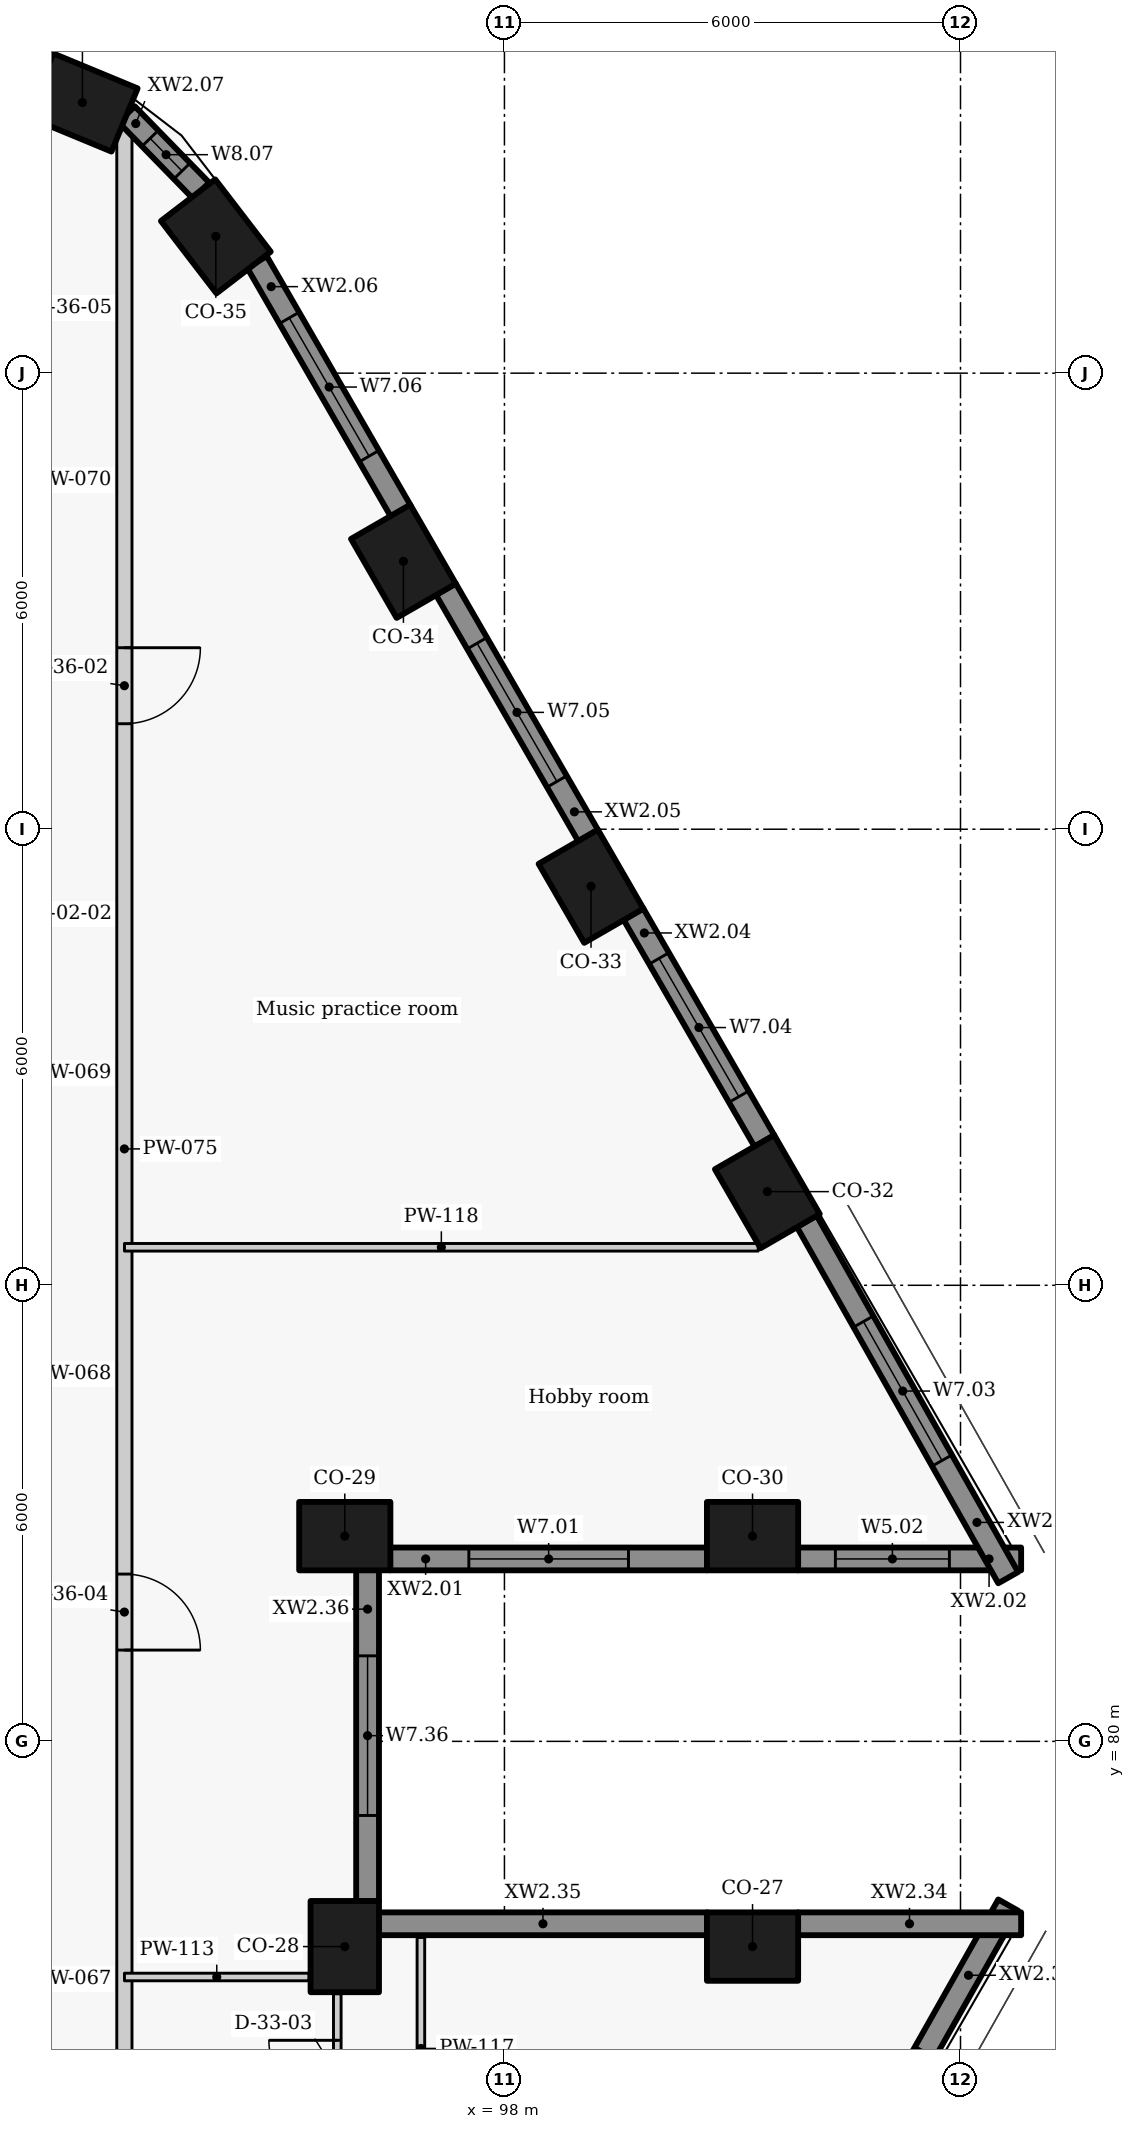
"""IFC4 building model, lengths in metres.
Left out: names, types, materials, properties, quantities, classifications, styles, units other than length and angle.
Written with IfcOpenShell. Run it as: python <this file> out.ifc"""

import sys

from ifc_helpers import new_model, si_unit, direction, frame, frame_2d, origin, origin_2d, place, context, subcontext, project, spatial, rectangle, extrude, element, fill, save


model = new_model("IFC4")
c1 = context("Model", 3, precision=1e-05, world=origin(), true_north=direction((0.0, 1.0)))
c2 = subcontext(c1, "Body", "Model", "MODEL_VIEW")
j1 = project(units=[si_unit("LENGTHUNIT", "METRE"), si_unit("PLANEANGLEUNIT", "RADIAN")], contexts=[c1])
p1 = place(None, origin())
s1 = spatial("IfcSite", under=j1, at=p1, CompositionType="ELEMENT")
p2 = place(p1, origin())
s2 = spatial("IfcBuilding", under=s1, at=p2, CompositionType="ELEMENT")
p3 = place(p2, frame((0.0, 0.0, 216.3)))
s3 = spatial("IfcBuildingStorey", under=s2, at=p3, CompositionType="ELEMENT", Elevation=216.3)
for number, where, z_axis, x_axis in (
    (1, (101.264, 77.3, 0.0), (0.0, 0.0, 1.0), (-1.0, 0.0, 0.0)),
    (2, (95.899, 77.3, 0.0), (0.0, 0.0, 1.0), (0.0, 1.0, 0.0)),
    (3, (95.899, 82.7, 0.0), (0.0, 0.0, 1.0), (1.0, 0.0, 0.0)),
    (4, (101.264, 82.7, 0.0), (0.0, 0.0, 1.0), (1.0, 0.0, 0.0)),
    (5, (101.459, 87.232, 0.0), (0.0, 0.0, 1.0), (-0.5, 0.866, 0.0)),
    (6, (99.139, 91.25, 0.0), (0.0, 0.0, 1.0), (-0.5, 0.866, 0.0)),
    (7, (96.671, 95.525, 0.0), (0.0, 0.0, 1.0), (-0.5, 0.866, 0.0)),
    (8, (94.203, 99.8, 0.0), (0.0, 0.0, 1.0), (-0.609, 0.793, 0.0)),
    (9, (92.448, 101.56, 0.0), (0.0, 0.0, 1.0), (-0.924, 0.383, 0.0)),
):
    element("IfcColumn", number, at=place(p3, frame(where, z_axis=z_axis, x_axis=x_axis)), inside=s3, PredefinedType="COLUMN", context=c2, shape_type="SweptSolid", body=[
        extrude(rectangle(XDim=1.2, YDim=0.9, at=origin_2d()), origin(), (0.0, 0.0, 1.0), 3.3),
    ])
p4 = place(p3, frame((96.496, 82.4, 0.0), z_axis=(0.0, 0.0, 1.0), x_axis=(1.0, 0.0, 0.0)))
e10 = element("IfcWall", 10, at=p4, inside=s3, PredefinedType="SOLIDWALL", context=c2, shape_type="SweptSolid", body=[
    extrude(rectangle(XDim=4.172, YDim=0.3, at=frame_2d((2.086, 0.0))), origin(), (0.0, 0.0, 1.0), 2.05),
])
p5 = place(p4, frame((1.036, 0.0, 0.9)))
e11 = element("IfcOpeningElement", 11, at=p5, cuts=e10, PredefinedType="OPENING", context=c2, shape_type="SweptSolid", body=[
    extrude(rectangle(XDim=2.1, YDim=1.1, at=frame_2d((1.05, 0.55))), frame((0.0, 0.16, 0.0), z_axis=(0.0, -1.0, 0.0), x_axis=(1.0, 0.0, 0.0)), (0.0, 0.0, 1.0), 0.32),
])
p6 = place(p3, frame((101.86, 82.4, 0.0), z_axis=(0.0, 0.0, 1.0), x_axis=(1.0, 0.0, 0.0)))
e12 = element("IfcWall", 12, at=p6, inside=s3, PredefinedType="SOLIDWALL", context=c2, shape_type="SweptSolid", body=[
    extrude(rectangle(XDim=2.938, YDim=0.3, at=frame_2d((1.469, 0.0))), origin(), (0.0, 0.0, 1.0), 2.05),
])
p7 = place(p6, frame((0.494, 0.0, 0.9)))
e13 = element("IfcOpeningElement", 13, at=p7, cuts=e12, PredefinedType="OPENING", context=c2, shape_type="SweptSolid", body=[
    extrude(rectangle(XDim=1.5, YDim=1.1, at=frame_2d((0.75, 0.55))), frame((0.0, 0.16, 0.0), z_axis=(0.0, -1.0, 0.0), x_axis=(1.0, 0.0, 0.0)), (0.0, 0.0, 1.0), 0.32),
])
p8 = place(p3, frame((104.627, 82.154, 0.0), z_axis=(0.0, 0.0, 1.0), x_axis=(-0.492033360928, 0.870576344575, 0.0)))
e14 = element("IfcWall", 14, at=p8, inside=s3, PredefinedType="SOLIDWALL", context=c2, shape_type="SweptSolid", body=[
    extrude(rectangle(XDim=5.387, YDim=0.3, at=frame_2d((2.693, 0.0))), origin(), (0.0, 0.0, 1.0), 2.05),
])
p9 = place(p8, frame((1.77, 0.0, 0.9)))
e15 = element("IfcOpeningElement", 15, at=p9, cuts=e14, PredefinedType="OPENING", context=c2, shape_type="SweptSolid", body=[
    extrude(rectangle(XDim=2.1, YDim=1.1, at=frame_2d((1.05, 0.55))), frame((0.0, 0.16, 0.0), z_axis=(0.0, -1.0, 0.0), x_axis=(1.0, 0.0, 0.0)), (0.0, 0.0, 1.0), 0.32),
])
p10 = place(p3, frame((101.421, 87.898, 0.0), z_axis=(0.0, 0.0, 1.0), x_axis=(-0.499955427682, 0.866051136095, 0.0)))
e16 = element("IfcWall", 16, at=p10, inside=s3, PredefinedType="SOLIDWALL", context=c2, shape_type="SweptSolid", body=[
    extrude(rectangle(XDim=3.447, YDim=0.3, at=frame_2d((1.724, 0.0))), origin(), (0.0, 0.0, 1.0), 2.05),
])
p11 = place(p10, frame((0.674, 0.0, 0.9)))
e17 = element("IfcOpeningElement", 17, at=p11, cuts=e16, PredefinedType="OPENING", context=c2, shape_type="SweptSolid", body=[
    extrude(rectangle(XDim=2.1, YDim=1.1, at=frame_2d((1.05, 0.55))), frame((0.0, 0.16, 0.0), z_axis=(0.0, -1.0, 0.0), x_axis=(1.0, 0.0, 0.0)), (0.0, 0.0, 1.0), 0.32),
])
p12 = place(p3, frame((99.101, 91.916, 0.0), z_axis=(0.0, 0.0, 1.0), x_axis=(-0.500059225181, 0.86599120741, 0.0)))
e18 = element("IfcWall", 18, at=p12, inside=s3, PredefinedType="SOLIDWALL", context=c2, shape_type="SweptSolid", body=[
    extrude(rectangle(XDim=3.744, YDim=0.3, at=frame_2d((1.872, 0.0))), origin(), (0.0, 0.0, 1.0), 2.05),
])
p13 = place(p12, frame((0.822, 0.0, 0.9)))
e19 = element("IfcOpeningElement", 19, at=p13, cuts=e18, PredefinedType="OPENING", context=c2, shape_type="SweptSolid", body=[
    extrude(rectangle(XDim=2.1, YDim=1.1, at=frame_2d((1.05, 0.55))), frame((0.0, 0.16, 0.0), z_axis=(0.0, -1.0, 0.0), x_axis=(1.0, 0.0, 0.0)), (0.0, 0.0, 1.0), 0.32),
])
p14 = place(p3, frame((96.633, 96.191, 0.0), z_axis=(0.0, 0.0, 1.0), x_axis=(-0.499961087031, 0.866047869032, 0.0)))
e20 = element("IfcWall", 20, at=p14, inside=s3, PredefinedType="SOLIDWALL", context=c2, shape_type="SweptSolid", body=[
    extrude(rectangle(XDim=3.779, YDim=0.3, at=frame_2d((1.889, 0.0))), origin(), (0.0, 0.0, 1.0), 2.05),
])
p15 = place(p14, frame((0.828, 0.0, 0.9)))
e21 = element("IfcOpeningElement", 21, at=p15, cuts=e20, PredefinedType="OPENING", context=c2, shape_type="SweptSolid", body=[
    extrude(rectangle(XDim=2.1, YDim=1.1, at=frame_2d((1.05, 0.55))), frame((0.0, 0.16, 0.0), z_axis=(0.0, -1.0, 0.0), x_axis=(1.0, 0.0, 0.0)), (0.0, 0.0, 1.0), 0.32),
])
p16 = place(p3, frame((94.009, 100.402, 0.0), z_axis=(0.0, 0.0, 1.0), x_axis=(-0.69817596362, 0.715926199984, 0.0)))
e22 = element("IfcWall", 22, at=p16, inside=s3, PredefinedType="SOLIDWALL", context=c2, shape_type="SweptSolid", body=[
    extrude(rectangle(XDim=1.403, YDim=0.3, at=frame_2d((0.701, 0.0))), origin(), (0.0, 0.0, 1.0), 2.05),
])
p17 = place(p16, frame((0.36, 0.0, 0.9)))
e23 = element("IfcOpeningElement", 23, at=p17, cuts=e22, PredefinedType="OPENING", context=c2, shape_type="SweptSolid", body=[
    extrude(rectangle(XDim=0.6, YDim=1.1, at=frame_2d((0.3, 0.55))), frame((0.0, 0.16, 0.0), z_axis=(0.0, -1.0, 0.0), x_axis=(1.0, 0.0, 0.0)), (0.0, 0.0, 1.0), 0.32),
])
p18 = place(p3, frame((101.977, 73.157, 0.0), z_axis=(0.0, 0.0, 1.0), x_axis=(0.492033360928, 0.870576344575, 0.0)))
e24 = element("IfcWall", 24, at=p18, inside=s3, PredefinedType="SOLIDWALL", context=c2, shape_type="SweptSolid", body=[
    extrude(rectangle(XDim=5.387, YDim=0.3, at=frame_2d((2.693, 0.0))), origin(), (0.0, 0.0, 1.0), 2.05),
])
p19 = place(p18, frame((1.064, 0.0, 0.9)))
e25 = element("IfcOpeningElement", 25, at=p19, cuts=e24, PredefinedType="OPENING", context=c2, shape_type="SweptSolid", body=[
    extrude(rectangle(XDim=2.1, YDim=1.1, at=frame_2d((1.05, 0.55))), frame((0.0, 0.16, 0.0), z_axis=(0.0, -1.0, 0.0), x_axis=(1.0, 0.0, 0.0)), (0.0, 0.0, 1.0), 0.32),
])
p20 = place(p3, frame((104.798, 77.6, 0.0), z_axis=(0.0, 0.0, 1.0), x_axis=(-1.0, 0.0, 0.0)))
e26 = element("IfcWall", 26, at=p20, inside=s3, PredefinedType="SOLIDWALL", context=c2, shape_type="SweptSolid", body=[
    extrude(rectangle(XDim=2.938, YDim=0.3, at=frame_2d((1.469, 0.0))), origin(), (0.0, 0.0, 1.0), 2.05),
])
p21 = place(p3, frame((100.668, 77.6, 0.0), z_axis=(0.0, 0.0, 1.0), x_axis=(-1.0, 0.0, 0.0)))
e27 = element("IfcWall", 27, at=p21, inside=s3, PredefinedType="SOLIDWALL", context=c2, shape_type="SweptSolid", body=[
    extrude(rectangle(XDim=4.323, YDim=0.3, at=frame_2d((2.161, 0.0))), origin(), (0.0, 0.0, 1.0), 2.05),
])
p22 = place(p3, frame((96.199, 77.896, 0.0), z_axis=(0.0, 0.0, 1.0), x_axis=(0.0, 1.0, 0.0)))
e28 = element("IfcWall", 28, at=p22, inside=s3, PredefinedType="SOLIDWALL", context=c2, shape_type="SweptSolid", body=[
    extrude(rectangle(XDim=4.358, YDim=0.3, at=frame_2d((2.179, 0.0))), origin(), (0.0, 0.0, 1.0), 2.05),
])
p23 = place(p22, frame((1.129, 0.0, 0.9)))
e29 = element("IfcOpeningElement", 29, at=p23, cuts=e28, PredefinedType="OPENING", context=c2, shape_type="SweptSolid", body=[
    extrude(rectangle(XDim=2.1, YDim=1.1, at=frame_2d((1.05, 0.55))), frame((0.0, 0.16, 0.0), z_axis=(0.0, -1.0, 0.0), x_axis=(1.0, 0.0, 0.0)), (0.0, 0.0, 1.0), 0.32),
])
p24 = place(p3, frame((93.0, 101.281, 0.0), z_axis=(0.0, 0.0, 1.0), x_axis=(0.0, -1.0, 0.0)))
e30 = element("IfcWall", 30, at=p24, inside=s3, PredefinedType="PARTITIONING", context=c2, shape_type="SweptSolid", body=[
    extrude(rectangle(XDim=42.606, YDim=0.2, at=frame_2d((21.303, 0.0))), origin(), (0.0, 0.0, 1.0), 2.03),
])
p25 = place(p24, frame((39.33, 0.0, 0.0)))
e31 = element("IfcOpeningElement", 31, at=p25, cuts=e30, PredefinedType="OPENING", context=c2, shape_type="SweptSolid", body=[
    extrude(rectangle(XDim=1.0, YDim=2.01, at=frame_2d((0.5, 1.005))), frame((0.0, 0.11, 0.0), z_axis=(0.0, -1.0, 0.0), x_axis=(1.0, 0.0, 0.0)), (0.0, 0.0, 1.0), 0.22),
])
p26 = place(p24, frame((28.98, 0.0, 0.0)))
e32 = element("IfcOpeningElement", 32, at=p26, cuts=e30, PredefinedType="OPENING", context=c2, shape_type="SweptSolid", body=[
    extrude(rectangle(XDim=1.0, YDim=2.01, at=frame_2d((0.5, 1.005))), frame((0.0, 0.11, 0.0), z_axis=(0.0, -1.0, 0.0), x_axis=(1.0, 0.0, 0.0)), (0.0, 0.0, 1.0), 0.22),
])
p27 = place(p24, frame((6.893, 0.0, 0.0)))
e33 = element("IfcOpeningElement", 33, at=p27, cuts=e30, PredefinedType="OPENING", context=c2, shape_type="SweptSolid", body=[
    extrude(rectangle(XDim=1.0, YDim=2.01, at=frame_2d((0.5, 1.005))), frame((0.0, 0.11, 0.0), z_axis=(0.0, -1.0, 0.0), x_axis=(1.0, 0.0, 0.0)), (0.0, 0.0, 1.0), 0.22),
])
p28 = place(p24, frame((19.08, 0.0, 0.0)))
e34 = element("IfcOpeningElement", 34, at=p28, cuts=e30, PredefinedType="OPENING", context=c2, shape_type="SweptSolid", body=[
    extrude(rectangle(XDim=1.0, YDim=2.01, at=frame_2d((0.5, 1.005))), frame((0.0, 0.11, 0.0), z_axis=(0.0, -1.0, 0.0), x_axis=(1.0, 0.0, 0.0)), (0.0, 0.0, 1.0), 0.22),
])
p29 = place(p3, frame((93.001, 76.9, 0.0), z_axis=(0.0, 0.0, 1.0), x_axis=(1.0, 0.0, 0.0)))
e35 = element("IfcWall", 35, at=p29, inside=s3, PredefinedType="PARTITIONING", context=c2, shape_type="SweptSolid", body=[
    extrude(rectangle(XDim=2.428, YDim=0.1, at=frame_2d((1.214, 0.0))), origin(), (0.0, 0.0, 1.0), 2.95),
])
p30 = place(p3, frame((95.801, 72.6, 0.0), z_axis=(0.0, 0.0, 1.0), x_axis=(0.0, 1.0, 0.0)))
e36 = element("IfcWall", 36, at=p30, inside=s3, PredefinedType="PARTITIONING", context=c2, shape_type="SweptSolid", body=[
    extrude(rectangle(XDim=4.08, YDim=0.1, at=frame_2d((2.04, 0.0))), origin(), (0.0, 0.0, 1.0), 2.95),
])
p31 = place(p30, frame((2.567, 0.0, 0.0)))
e37 = element("IfcOpeningElement", 37, at=p31, cuts=e36, PredefinedType="OPENING", context=c2, shape_type="SweptSolid", body=[
    extrude(rectangle(XDim=0.9, YDim=2.1, at=frame_2d((0.45, 1.05))), frame((0.0, 0.06, 0.0), z_axis=(0.0, -1.0, 0.0), x_axis=(1.0, 0.0, 0.0)), (0.0, 0.0, 1.0), 0.12),
])
p32 = place(p3, frame((96.901, 77.42, 0.0), z_axis=(0.0, 0.0, 1.0), x_axis=(0.0, -1.0, 0.0)))
e38 = element("IfcWall", 38, at=p32, inside=s3, PredefinedType="PARTITIONING", context=c2, shape_type="SweptSolid", body=[
    extrude(rectangle(XDim=6.42, YDim=0.1, at=frame_2d((3.21, 0.0))), origin(), (0.0, 0.0, 1.0), 2.03),
])
p33 = place(p32, frame((3.02, 0.0, 0.0)))
e39 = element("IfcOpeningElement", 39, at=p33, cuts=e38, PredefinedType="OPENING", context=c2, shape_type="SweptSolid", body=[
    extrude(rectangle(XDim=0.9, YDim=2.01, at=frame_2d((0.45, 1.005))), frame((0.0, 0.06, 0.0), z_axis=(0.0, -1.0, 0.0), x_axis=(1.0, 0.0, 0.0)), (0.0, 0.0, 1.0), 0.12),
])
p34 = place(p3, frame((93.001, 86.5, 0.0), z_axis=(0.0, 0.0, 1.0), x_axis=(1.0, 0.0, 0.0)))
e40 = element("IfcWall", 40, at=p34, inside=s3, PredefinedType="PARTITIONING", context=c2, shape_type="SweptSolid", body=[
    extrude(rectangle(XDim=8.338, YDim=0.1, at=frame_2d((4.169, 0.0))), origin(), (0.0, 0.0, 1.0), 2.95),
])
p35 = place(p5, origin())
e41 = element("IfcWindow", 41, at=p35, inside=s3, PartitioningType="SINGLE_PANEL", PredefinedType="WINDOW", context=c2, shape_type="SweptSolid", body=[
    extrude(rectangle(XDim=2.1, YDim=1.1, at=frame_2d((1.05, 0.55))), frame((0.0, 0.03, 0.0), z_axis=(0.0, -1.0, 0.0), x_axis=(1.0, 0.0, 0.0)), (0.0, 0.0, 1.0), 0.06),
])
fill(e11, e41)
p36 = place(p7, origin())
e42 = element("IfcWindow", 42, at=p36, inside=s3, PartitioningType="SINGLE_PANEL", PredefinedType="WINDOW", context=c2, shape_type="SweptSolid", body=[
    extrude(rectangle(XDim=1.5, YDim=1.1, at=frame_2d((0.75, 0.55))), frame((0.0, 0.03, 0.0), z_axis=(0.0, -1.0, 0.0), x_axis=(1.0, 0.0, 0.0)), (0.0, 0.0, 1.0), 0.06),
])
fill(e13, e42)
p37 = place(p9, origin())
e43 = element("IfcWindow", 43, at=p37, inside=s3, PartitioningType="SINGLE_PANEL", PredefinedType="WINDOW", context=c2, shape_type="SweptSolid", body=[
    extrude(rectangle(XDim=2.1, YDim=1.1, at=frame_2d((1.05, 0.55))), frame((0.0, 0.03, 0.0), z_axis=(0.0, -1.0, 0.0), x_axis=(1.0, 0.0, 0.0)), (0.0, 0.0, 1.0), 0.06),
])
fill(e15, e43)
p38 = place(p11, origin())
e44 = element("IfcWindow", 44, at=p38, inside=s3, PartitioningType="SINGLE_PANEL", PredefinedType="WINDOW", context=c2, shape_type="SweptSolid", body=[
    extrude(rectangle(XDim=2.1, YDim=1.1, at=frame_2d((1.05, 0.55))), frame((0.0, 0.03, 0.0), z_axis=(0.0, -1.0, 0.0), x_axis=(1.0, 0.0, 0.0)), (0.0, 0.0, 1.0), 0.06),
])
fill(e17, e44)
p39 = place(p13, origin())
e45 = element("IfcWindow", 45, at=p39, inside=s3, PartitioningType="SINGLE_PANEL", PredefinedType="WINDOW", context=c2, shape_type="SweptSolid", body=[
    extrude(rectangle(XDim=2.1, YDim=1.1, at=frame_2d((1.05, 0.55))), frame((0.0, 0.03, 0.0), z_axis=(0.0, -1.0, 0.0), x_axis=(1.0, 0.0, 0.0)), (0.0, 0.0, 1.0), 0.06),
])
fill(e19, e45)
p40 = place(p15, origin())
e46 = element("IfcWindow", 46, at=p40, inside=s3, PartitioningType="SINGLE_PANEL", PredefinedType="WINDOW", context=c2, shape_type="SweptSolid", body=[
    extrude(rectangle(XDim=2.1, YDim=1.1, at=frame_2d((1.05, 0.55))), frame((0.0, 0.03, 0.0), z_axis=(0.0, -1.0, 0.0), x_axis=(1.0, 0.0, 0.0)), (0.0, 0.0, 1.0), 0.06),
])
fill(e21, e46)
p41 = place(p17, origin())
e47 = element("IfcWindow", 47, at=p41, inside=s3, PartitioningType="SINGLE_PANEL", PredefinedType="WINDOW", context=c2, shape_type="SweptSolid", body=[
    extrude(rectangle(XDim=0.6, YDim=1.1, at=frame_2d((0.3, 0.55))), frame((0.0, 0.03, 0.0), z_axis=(0.0, -1.0, 0.0), x_axis=(1.0, 0.0, 0.0)), (0.0, 0.0, 1.0), 0.06),
])
fill(e23, e47)
p42 = place(p23, origin())
e48 = element("IfcWindow", 48, at=p42, inside=s3, PartitioningType="SINGLE_PANEL", PredefinedType="WINDOW", context=c2, shape_type="SweptSolid", body=[
    extrude(rectangle(XDim=2.1, YDim=1.1, at=frame_2d((1.05, 0.55))), frame((0.0, 0.03, 0.0), z_axis=(0.0, -1.0, 0.0), x_axis=(1.0, 0.0, 0.0)), (0.0, 0.0, 1.0), 0.06),
])
fill(e29, e48)
p43 = place(p31, origin())
e49 = element("IfcDoor", 49, at=p43, inside=s3, OperationType="SINGLE_SWING_RIGHT", PredefinedType="DOOR", context=c2, shape_type="SweptSolid", body=[
    extrude(rectangle(XDim=0.9, YDim=2.1, at=frame_2d((0.45, 1.05))), frame((0.0, 0.025, 0.0), z_axis=(0.0, -1.0, 0.0), x_axis=(1.0, 0.0, 0.0)), (0.0, 0.0, 1.0), 0.05),
])
fill(e37, e49)
p44 = place(p27, origin())
e50 = element("IfcDoor", 50, at=p44, inside=s3, OperationType="SINGLE_SWING_LEFT", PredefinedType="DOOR", context=c2, shape_type="SweptSolid", body=[
    extrude(rectangle(XDim=1.0, YDim=2.01, at=frame_2d((0.5, 1.005))), frame((0.0, 0.025, 0.0), z_axis=(0.0, -1.0, 0.0), x_axis=(1.0, 0.0, 0.0)), (0.0, 0.0, 1.0), 0.05),
])
fill(e33, e50)
p45 = place(p28, origin())
e51 = element("IfcDoor", 51, at=p45, inside=s3, OperationType="SINGLE_SWING_RIGHT", PredefinedType="DOOR", context=c2, shape_type="SweptSolid", body=[
    extrude(rectangle(XDim=1.0, YDim=2.01, at=frame_2d((0.5, 1.005))), frame((0.0, 0.025, 0.0), z_axis=(0.0, -1.0, 0.0), x_axis=(1.0, 0.0, 0.0)), (0.0, 0.0, 1.0), 0.05),
])
fill(e34, e51)
save(model, sys.argv[1])
